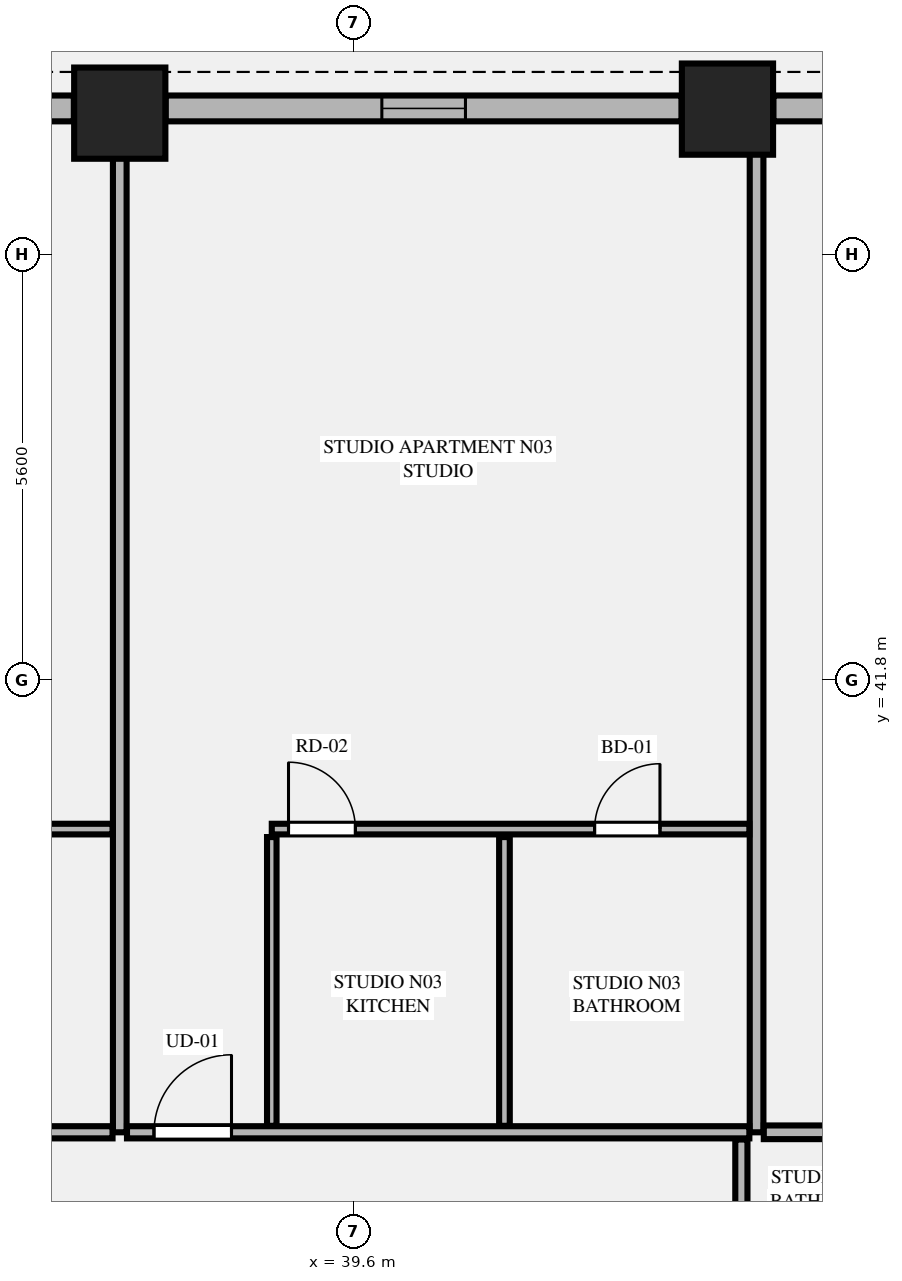
"""IFC4 building model, lengths in metres.
Left out: names, types, materials, properties, quantities, classifications, styles, units other than length and angle.
Written with IfcOpenShell. Run it as: python <this file> out.ifc"""

import sys

from ifc_helpers import new_model, si_unit, direction, frame, frame_2d, origin, origin_2d, place, context, subcontext, project, spatial, rectangle, extrude, element, fill, save


model = new_model("IFC4")
c1 = context("Model", 3, precision=1e-05, world=origin(), true_north=direction((0.0, 1.0)))
c2 = subcontext(c1, "Body", "Model", "MODEL_VIEW")
j1 = project(units=[si_unit("LENGTHUNIT", "METRE"), si_unit("PLANEANGLEUNIT", "RADIAN")], contexts=[c1])
p1 = place(None, origin())
s1 = spatial("IfcSite", under=j1, at=p1, CompositionType="ELEMENT")
p2 = place(p1, origin())
s2 = spatial("IfcBuilding", under=s1, at=p2, CompositionType="ELEMENT")
p3 = place(p2, frame((0.0, 0.0, 24.9)))
s3 = spatial("IfcBuildingStorey", under=s2, at=p3, CompositionType="ELEMENT", Elevation=24.9)
for number, where, z_axis, x_axis in (
    (1, (44.517, 49.311, 0.0), (0.0, 0.0, 1.0), (1.0, 0.0, 0.0)),
    (2, (36.522, 49.258, 0.0), (0.0, 0.0, 1.0), (1.0, 0.0, 0.0)),
):
    element("IfcColumn", number, at=place(p3, frame(where, z_axis=z_axis, x_axis=x_axis)), inside=s3, PredefinedType="COLUMN", context=c2, shape_type="SweptSolid", body=[
        extrude(rectangle(XDim=1.2, YDim=1.2, at=origin_2d()), origin(), (0.0, 0.0, 1.0), 3.55),
    ])
p4 = place(p3, frame((46.366, 49.32, 0.0), z_axis=(0.0, 0.0, 1.0), x_axis=(-1.0, 0.0, 0.0)))
e3 = element("IfcWall", 3, at=p4, inside=s3, PredefinedType="STANDARD", context=c2, shape_type="SweptSolid", body=[
    extrude(rectangle(XDim=1.245, YDim=0.34, at=frame_2d((0.623, 0.0))), origin(), (0.0, 0.0, 1.0), 3.33),
])
p5 = place(p3, frame((43.913, 49.32, 0.0), z_axis=(0.0, 0.0, 1.0), x_axis=(-1.0, 0.0, 0.0)))
e4 = element("IfcWall", 4, at=p5, inside=s3, PredefinedType="STANDARD", context=c2, shape_type="SweptSolid", body=[
    extrude(rectangle(XDim=6.787, YDim=0.34, at=frame_2d((3.394, 0.0))), origin(), (0.0, 0.0, 1.0), 2.787),
])
p6 = place(p5, frame((2.843, 0.0, 0.75)))
e5 = element("IfcOpeningElement", 5, at=p6, cuts=e4, PredefinedType="OPENING", context=c2, shape_type="SweptSolid", body=[
    extrude(rectangle(XDim=1.1, YDim=1.887, at=frame_2d((0.55, 0.943))), frame((0.0, 0.18, 0.0), z_axis=(0.0, -1.0, 0.0), x_axis=(1.0, 0.0, 0.0)), (0.0, 0.0, 1.0), 0.36),
])
p7 = place(p3, frame((35.918, 49.32, 0.0), z_axis=(0.0, 0.0, 1.0), x_axis=(-1.0, 0.0, 0.0)))
e6 = element("IfcWall", 6, at=p7, inside=s3, PredefinedType="STANDARD", context=c2, shape_type="SweptSolid", body=[
    extrude(rectangle(XDim=7.036, YDim=0.34, at=frame_2d((3.518, 0.0))), origin(), (0.0, 0.0, 1.0), 2.787),
])
p8 = place(p7, frame((2.768, 0.0, 0.0)))
e7 = element("IfcOpeningElement", 7, at=p8, cuts=e6, PredefinedType="OPENING", context=c2, shape_type="SweptSolid", body=[
    extrude(rectangle(XDim=1.5, YDim=2.3, at=frame_2d((0.75, 1.15))), frame((0.0, 0.18, 0.0), z_axis=(0.0, -1.0, 0.0), x_axis=(1.0, 0.0, 0.0)), (0.0, 0.0, 1.0), 0.36),
])
p9 = place(p3, frame((36.522, 35.85, 0.0), z_axis=(0.0, 0.0, 1.0), x_axis=(0.0, 1.0, 0.0)))
e8 = element("IfcWall", 8, at=p9, inside=s3, PredefinedType="PARTITIONING", context=c2, shape_type="SweptSolid", body=[
    extrude(rectangle(XDim=13.295, YDim=0.18, at=frame_2d((6.647, 0.0))), origin(), (0.0, 0.0, 1.0), 2.637),
])
p10 = place(p3, frame((44.9, 35.85, 0.0), z_axis=(0.0, 0.0, 1.0), x_axis=(0.0, 1.0, 0.0)))
e9 = element("IfcWall", 9, at=p10, inside=s3, PredefinedType="PARTITIONING", context=c2, shape_type="SweptSolid", body=[
    extrude(rectangle(XDim=13.295, YDim=0.18, at=frame_2d((6.647, 0.0))), origin(), (0.0, 0.0, 1.0), 3.33),
])
p11 = place(p3, frame((28.373, 35.85, 0.0), z_axis=(0.0, 0.0, 1.0), x_axis=(1.0, 0.0, 0.0)))
e10 = element("IfcWall", 10, at=p11, inside=s3, PredefinedType="PARTITIONING", context=c2, shape_type="SweptSolid", body=[
    extrude(rectangle(XDim=8.054, YDim=0.16, at=frame_2d((4.027, 0.0))), origin(), (0.0, 0.0, 1.0), 3.33),
])
p12 = place(p11, frame((0.355, 0.0, 0.0)))
e11 = element("IfcOpeningElement", 11, at=p12, cuts=e10, PredefinedType="OPENING", context=c2, shape_type="SweptSolid", body=[
    extrude(rectangle(XDim=1.02, YDim=2.25, at=frame_2d((0.51, 1.125))), frame((0.0, 0.09, 0.0), z_axis=(0.0, -1.0, 0.0), x_axis=(1.0, 0.0, 0.0)), (0.0, 0.0, 1.0), 0.18),
])
p13 = place(p3, frame((30.278, 39.839, 0.0), z_axis=(0.0, 0.0, 1.0), x_axis=(1.0, 0.0, 0.0)))
e12 = element("IfcWall", 12, at=p13, inside=s3, PredefinedType="PLUMBINGWALL", context=c2, shape_type="SweptSolid", body=[
    extrude(rectangle(XDim=6.149, YDim=0.14, at=frame_2d((3.074, 0.0))), origin(), (0.0, 0.0, 1.0), 3.33),
])
p14 = place(p13, frame((4.148, 0.0, 0.0)))
e13 = element("IfcOpeningElement", 13, at=p14, cuts=e12, PredefinedType="OPENING", context=c2, shape_type="SweptSolid", body=[
    extrude(rectangle(XDim=0.86, YDim=2.1, at=frame_2d((0.43, 1.05))), frame((0.0, 0.08, 0.0), z_axis=(0.0, -1.0, 0.0), x_axis=(1.0, 0.0, 0.0)), (0.0, 0.0, 1.0), 0.16),
])
p15 = place(p13, frame((0.22, 0.0, 0.0)))
e14 = element("IfcOpeningElement", 14, at=p15, cuts=e12, PredefinedType="OPENING", context=c2, shape_type="SweptSolid", body=[
    extrude(rectangle(XDim=0.88, YDim=2.15, at=frame_2d((0.44, 1.075))), frame((0.0, 0.08, 0.0), z_axis=(0.0, -1.0, 0.0), x_axis=(1.0, 0.0, 0.0)), (0.0, 0.0, 1.0), 0.16),
])
p16 = place(p3, frame((36.617, 35.85, 0.0), z_axis=(0.0, 0.0, 1.0), x_axis=(1.0, 0.0, 0.0)))
e15 = element("IfcWall", 15, at=p16, inside=s3, PredefinedType="PARTITIONING", context=c2, shape_type="SweptSolid", body=[
    extrude(rectangle(XDim=8.188, YDim=0.16, at=frame_2d((4.094, 0.0))), origin(), (0.0, 0.0, 1.0), 3.33),
])
p17 = place(p16, frame((0.355, 0.0, 0.0)))
e16 = element("IfcOpeningElement", 16, at=p17, cuts=e15, PredefinedType="OPENING", context=c2, shape_type="SweptSolid", body=[
    extrude(rectangle(XDim=1.02, YDim=2.25, at=frame_2d((0.51, 1.125))), frame((0.0, 0.09, 0.0), z_axis=(0.0, -1.0, 0.0), x_axis=(1.0, 0.0, 0.0)), (0.0, 0.0, 1.0), 0.18),
])
p18 = place(p3, frame((38.522, 35.935, 0.0), z_axis=(0.0, 0.0, 1.0), x_axis=(0.0, 1.0, 0.0)))
e17 = element("IfcWall", 17, at=p18, inside=s3, PredefinedType="PARTITIONING", context=c2, shape_type="SweptSolid", body=[
    extrude(rectangle(XDim=3.799, YDim=0.125, at=frame_2d((1.899, 0.0))), origin(), (0.0, 0.0, 1.0), 3.33),
])
p19 = place(p3, frame((38.522, 39.839, 0.0), z_axis=(0.0, 0.0, 1.0), x_axis=(1.0, 0.0, 0.0)))
e18 = element("IfcWall", 18, at=p19, inside=s3, PredefinedType="PLUMBINGWALL", context=c2, shape_type="SweptSolid", body=[
    extrude(rectangle(XDim=6.283, YDim=0.14, at=frame_2d((3.142, 0.0))), origin(), (0.0, 0.0, 1.0), 3.33),
])
p20 = place(p19, frame((4.247, 0.0, 0.0)))
e19 = element("IfcOpeningElement", 19, at=p20, cuts=e18, PredefinedType="OPENING", context=c2, shape_type="SweptSolid", body=[
    extrude(rectangle(XDim=0.86, YDim=2.1, at=frame_2d((0.43, 1.05))), frame((0.0, 0.08, 0.0), z_axis=(0.0, -1.0, 0.0), x_axis=(1.0, 0.0, 0.0)), (0.0, 0.0, 1.0), 0.16),
])
p21 = place(p19, frame((0.22, 0.0, 0.0)))
e20 = element("IfcOpeningElement", 20, at=p21, cuts=e18, PredefinedType="OPENING", context=c2, shape_type="SweptSolid", body=[
    extrude(rectangle(XDim=0.88, YDim=2.15, at=frame_2d((0.44, 1.075))), frame((0.0, 0.08, 0.0), z_axis=(0.0, -1.0, 0.0), x_axis=(1.0, 0.0, 0.0)), (0.0, 0.0, 1.0), 0.16),
])
p22 = place(p3, frame((41.583, 35.935, 0.0), z_axis=(0.0, 0.0, 1.0), x_axis=(0.0, 1.0, 0.0)))
e21 = element("IfcWall", 21, at=p22, inside=s3, PredefinedType="PLUMBINGWALL", context=c2, shape_type="SweptSolid", body=[
    extrude(rectangle(XDim=3.799, YDim=0.14, at=frame_2d((1.899, 0.0))), origin(), (0.0, 0.0, 1.0), 3.33),
])
p23 = place(p3, frame((44.995, 35.85, 0.0), z_axis=(0.0, 0.0, 1.0), x_axis=(1.0, 0.0, 0.0)))
e22 = element("IfcWall", 22, at=p23, inside=s3, PredefinedType="PARTITIONING", context=c2, shape_type="SweptSolid", body=[
    extrude(rectangle(XDim=9.14, YDim=0.18, at=frame_2d((4.57, 0.0))), origin(), (0.0, 0.0, 1.0), 3.33),
])
p24 = place(p3, frame((44.7, 29.378, 0.0), z_axis=(0.0, 0.0, 1.0), x_axis=(0.0, 1.0, 0.0)))
e23 = element("IfcWall", 23, at=p24, inside=s3, PredefinedType="PARTITIONING", context=c2, shape_type="SweptSolid", body=[
    extrude(rectangle(XDim=6.377, YDim=0.16, at=frame_2d((3.188, 0.0))), origin(), (0.0, 0.0, 1.0), 3.33),
])
p25 = place(p24, frame((0.4, 0.0, 0.0)))
e24 = element("IfcOpeningElement", 24, at=p25, cuts=e23, PredefinedType="OPENING", context=c2, shape_type="SweptSolid", body=[
    extrude(rectangle(XDim=1.02, YDim=2.25, at=frame_2d((0.51, 1.125))), frame((0.0, 0.09, 0.0), z_axis=(0.0, -1.0, 0.0), x_axis=(1.0, 0.0, 0.0)), (0.0, 0.0, 1.0), 0.18),
])
p26 = place(p6, origin())
e25 = element("IfcWindow", 25, at=p26, inside=s3, PartitioningType="SINGLE_PANEL", PredefinedType="WINDOW", context=c2, shape_type="SweptSolid", body=[
    extrude(rectangle(XDim=1.1, YDim=1.887, at=frame_2d((0.55, 0.943))), frame((0.0, 0.03, 0.0), z_axis=(0.0, -1.0, 0.0), x_axis=(1.0, 0.0, 0.0)), (0.0, 0.0, 1.0), 0.06),
])
fill(e5, e25)
p27 = place(p20, origin())
e26 = element("IfcDoor", 26, at=p27, inside=s3, OperationType="SINGLE_SWING_RIGHT", PredefinedType="DOOR", context=c2, shape_type="SweptSolid", body=[
    extrude(rectangle(XDim=0.86, YDim=2.1, at=frame_2d((0.43, 1.05))), frame((0.0, 0.025, 0.0), z_axis=(0.0, -1.0, 0.0), x_axis=(1.0, 0.0, 0.0)), (0.0, 0.0, 1.0), 0.05),
])
fill(e19, e26)
p28 = place(p17, origin())
e27 = element("IfcDoor", 27, at=p28, inside=s3, OperationType="SINGLE_SWING_RIGHT", PredefinedType="DOOR", context=c2, shape_type="SweptSolid", body=[
    extrude(rectangle(XDim=1.02, YDim=2.25, at=frame_2d((0.51, 1.125))), frame((0.0, 0.025, 0.0), z_axis=(0.0, -1.0, 0.0), x_axis=(1.0, 0.0, 0.0)), (0.0, 0.0, 1.0), 0.05),
])
fill(e16, e27)
p29 = place(p21, origin())
e28 = element("IfcDoor", 28, at=p29, inside=s3, OperationType="SINGLE_SWING_LEFT", PredefinedType="DOOR", context=c2, shape_type="SweptSolid", body=[
    extrude(rectangle(XDim=0.88, YDim=2.15, at=frame_2d((0.44, 1.075))), frame((0.0, 0.025, 0.0), z_axis=(0.0, -1.0, 0.0), x_axis=(1.0, 0.0, 0.0)), (0.0, 0.0, 1.0), 0.05),
])
fill(e20, e28)
save(model, sys.argv[1])
